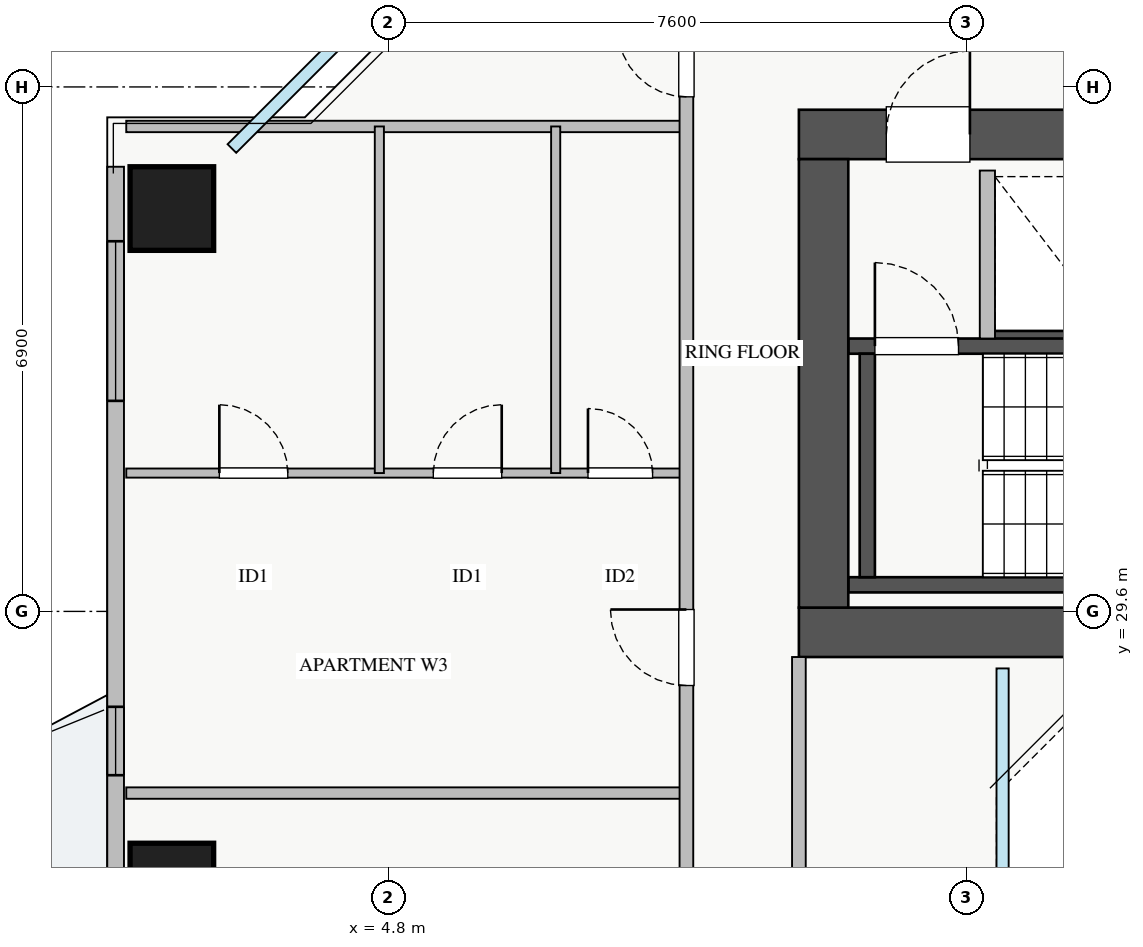
"""IFC4 building model, lengths in metres.
Left out: names, types, materials, properties, quantities, classifications, styles, units other than length and angle.
Written with IfcOpenShell. Run it as: python <this file> out.ifc"""

import sys

from ifc_helpers import new_model, si_unit, direction, frame, frame_2d, origin, origin_2d, place, context, subcontext, project, spatial, rectangle, extrude, source, transform, mapped, element, fill, save


model = new_model("IFC4")
c1 = context("Model", 3, precision=1e-05, world=origin(), true_north=direction((0.0, 1.0)))
c2 = subcontext(c1, "Body", "Model", "MODEL_VIEW")
j1 = project(units=[si_unit("LENGTHUNIT", "METRE"), si_unit("PLANEANGLEUNIT", "RADIAN")], contexts=[c1])
p1 = place(None, origin())
s1 = spatial("IfcSite", under=j1, at=p1, CompositionType="ELEMENT")
p2 = place(p1, origin())
s2 = spatial("IfcBuilding", under=s1, at=p2, CompositionType="ELEMENT")
p3 = place(p2, frame((0.0, 0.0, 123.0)))
s3 = spatial("IfcBuildingStorey", under=s2, at=p3, CompositionType="ELEMENT", Elevation=123.0)
p4 = place(p3, frame((12.68, 33.2, 0.0), z_axis=(0.0, 0.0, 1.0), x_axis=(1.0, 0.0, 0.0)))
e1 = element("IfcWall", 1, at=p4, inside=s3, PredefinedType="SHEAR", context=c2, shape_type="SweptSolid", body=[
    extrude(rectangle(XDim=1.94, YDim=0.18, at=frame_2d((0.97, 0.0))), origin(), (0.0, 0.0, 1.0), 3.07),
])
p5 = place(p3, frame((10.85, 29.95, 0.0), z_axis=(0.0, 0.0, 1.0), x_axis=(1.0, 0.0, 0.0)))
e2 = element("IfcWall", 2, at=p5, inside=s3, PredefinedType="SHEAR", context=c2, shape_type="SweptSolid", body=[
    extrude(rectangle(XDim=7.3, YDim=0.2, at=frame_2d((3.65, 0.0))), origin(), (0.0, 0.0, 1.0), 3.25),
])
p6 = place(p3, frame((10.85, 33.09, 0.0), z_axis=(0.0, 0.0, 1.0), x_axis=(1.0, 0.0, 0.0)))
e3 = element("IfcWall", 3, at=p6, inside=s3, PredefinedType="SHEAR", context=c2, shape_type="SweptSolid", body=[
    extrude(rectangle(XDim=7.3, YDim=0.2, at=frame_2d((3.65, 0.0))), origin(), (0.0, 0.0, 1.0), 3.25),
])
p7 = place(p6, frame((0.35, 0.0, 0.0)))
e4 = element("IfcOpeningElement", 4, at=p7, cuts=e3, PredefinedType="OPENING", context=c2, shape_type="SweptSolid", body=[
    extrude(rectangle(XDim=1.1, YDim=2.05, at=frame_2d((0.55, 1.025))), frame((0.0, 0.11, 0.0), z_axis=(0.0, -1.0, 0.0), x_axis=(1.0, 0.0, 0.0)), (0.0, 0.0, 1.0), 0.22),
])
p8 = place(p3, frame((11.1, 30.05, 0.0), z_axis=(0.0, 0.0, 1.0), x_axis=(0.0, 1.0, 0.0)))
e5 = element("IfcWall", 5, at=p8, inside=s3, PredefinedType="SHEAR", context=c2, shape_type="SweptSolid", body=[
    extrude(rectangle(XDim=2.94, YDim=0.2, at=frame_2d((1.47, 0.0))), origin(), (0.0, 0.0, 1.0), 3.25),
])
p9 = place(p3, frame((10.2, 29.325, 0.0), z_axis=(0.0, 0.0, 1.0), x_axis=(1.0, 0.0, 0.0)))
e6 = element("IfcWall", 6, at=p9, inside=s3, PredefinedType="SHEAR", context=c2, shape_type="SweptSolid", body=[
    extrude(rectangle(XDim=17.6, YDim=0.65, at=frame_2d((8.8, 0.0))), origin(), (0.0, 0.0, 1.0), 3.25),
])
p10 = place(p3, frame((10.2, 35.875, 0.0), z_axis=(0.0, 0.0, 1.0), x_axis=(1.0, 0.0, 0.0)))
e7 = element("IfcWall", 7, at=p10, inside=s3, PredefinedType="SHEAR", context=c2, shape_type="SweptSolid", body=[
    extrude(rectangle(XDim=17.6, YDim=0.65, at=frame_2d((8.8, 0.0))), origin(), (0.0, 0.0, 1.0), 3.25),
])
p11 = place(p10, frame((1.15, 0.0, 0.0)))
e8 = element("IfcOpeningElement", 8, at=p11, cuts=e7, PredefinedType="OPENING", context=c2, shape_type="SweptSolid", body=[
    extrude(rectangle(XDim=1.1, YDim=2.05, at=frame_2d((0.55, 1.025))), frame((0.0, 0.335, 0.0), z_axis=(0.0, -1.0, 0.0), x_axis=(1.0, 0.0, 0.0)), (0.0, 0.0, 1.0), 0.67),
])
p12 = place(p10, frame((8.3, 0.0, 0.0)))
e9 = element("IfcOpeningElement", 9, at=p12, cuts=e7, PredefinedType="OPENING", context=c2, shape_type="SweptSolid", body=[
    extrude(rectangle(XDim=1.1, YDim=2.05, at=frame_2d((0.55, 1.025))), frame((0.0, 0.335, 0.0), z_axis=(0.0, -1.0, 0.0), x_axis=(1.0, 0.0, 0.0)), (0.0, 0.0, 1.0), 0.67),
])
p13 = place(p10, frame((4.9, 0.0, 0.0)))
e10 = element("IfcOpeningElement", 10, at=p13, cuts=e7, PredefinedType="OPENING", context=c2, shape_type="SweptSolid", body=[
    extrude(rectangle(XDim=1.1, YDim=2.05, at=frame_2d((0.55, 1.025))), frame((0.0, 0.335, 0.0), z_axis=(0.0, -1.0, 0.0), x_axis=(1.0, 0.0, 0.0)), (0.0, 0.0, 1.0), 0.67),
])
p14 = place(p10, frame((14.74, 0.0, 0.0)))
e11 = element("IfcOpeningElement", 11, at=p14, cuts=e7, PredefinedType="OPENING", context=c2, shape_type="SweptSolid", body=[
    extrude(rectangle(XDim=1.0, YDim=2.05, at=frame_2d((0.5, 1.025))), frame((0.0, 0.335, 0.0), z_axis=(0.0, -1.0, 0.0), x_axis=(1.0, 0.0, 0.0)), (0.0, 0.0, 1.0), 0.67),
])
p15 = place(p10, frame((10.005, 0.0, 0.0)))
e12 = element("IfcOpeningElement", 12, at=p15, cuts=e7, PredefinedType="OPENING", context=c2, shape_type="SweptSolid", body=[
    extrude(rectangle(XDim=1.0, YDim=2.05, at=frame_2d((0.5, 1.025))), frame((0.0, 0.335, 0.0), z_axis=(0.0, -1.0, 0.0), x_axis=(1.0, 0.0, 0.0)), (0.0, 0.0, 1.0), 0.67),
])
p16 = place(p10, frame((11.55, 0.0, 0.0)))
e13 = element("IfcOpeningElement", 13, at=p16, cuts=e7, PredefinedType="OPENING", context=c2, shape_type="SweptSolid", body=[
    extrude(rectangle(XDim=1.0, YDim=2.05, at=frame_2d((0.5, 1.025))), frame((0.0, 0.335, 0.0), z_axis=(0.0, -1.0, 0.0), x_axis=(1.0, 0.0, 0.0)), (0.0, 0.0, 1.0), 0.67),
])
p17 = place(p10, frame((13.215, 0.0, 0.0)))
e14 = element("IfcOpeningElement", 14, at=p17, cuts=e7, PredefinedType="OPENING", context=c2, shape_type="SweptSolid", body=[
    extrude(rectangle(XDim=1.0, YDim=2.05, at=frame_2d((0.5, 1.025))), frame((0.0, 0.335, 0.0), z_axis=(0.0, -1.0, 0.0), x_axis=(1.0, 0.0, 0.0)), (0.0, 0.0, 1.0), 0.67),
])
p18 = place(p3, frame((10.525, 29.65, 0.0), z_axis=(0.0, 0.0, 1.0), x_axis=(0.0, 1.0, 0.0)))
e15 = element("IfcWall", 15, at=p18, inside=s3, PredefinedType="SHEAR", context=c2, shape_type="SweptSolid", body=[
    extrude(rectangle(XDim=5.9, YDim=0.65, at=frame_2d((2.95, 0.0))), origin(), (0.0, 0.0, 1.0), 3.25),
])
m1 = source(origin(), c2, "Body", "SweptSolid", [
    extrude(rectangle(XDim=1.1, YDim=1.1, at=origin_2d()), origin(), (0.0, 0.0, 1.0), 3.25),
])
for number, where, z_axis, x_axis in (
    (16, (1.95, 34.9, 0.0), (0.0, 0.0, 1.0), (1.0, 0.0, 0.0)),
    (17, (1.95, 26.0, 0.0), (0.0, 0.0, 1.0), (1.0, 0.0, 0.0)),
):
    element("IfcColumn", number, at=place(p3, frame(where, z_axis=z_axis, x_axis=x_axis)), inside=s3, PredefinedType="COLUMN", context=c2, shape_type="MappedRepresentation", body=[
        mapped(m1, transform((0.0, 0.0, 0.0), x_axis=(1.0, 0.0, 0.0), y_axis=(0.0, 1.0, 0.0), z_axis=(0.0, 0.0, 1.0), scale=1.0)),
    ])
p19 = place(p3, frame((1.21, 10.55, 0.0), z_axis=(0.0, 0.0, 1.0), x_axis=(0.0, 1.0, 0.0)))
e18 = element("IfcWall", 18, at=p19, inside=s3, PredefinedType="STANDARD", context=c2, shape_type="SweptSolid", body=[
    extrude(rectangle(XDim=24.9, YDim=0.22, at=frame_2d((12.45, 0.0))), origin(), (0.0, 0.0, 1.0), 2.61),
])
p20 = place(p19, frame((13.3, 0.0, 0.0)))
e19 = element("IfcOpeningElement", 19, at=p20, cuts=e18, PredefinedType="OPENING", context=c2, shape_type="SweptSolid", body=[
    extrude(rectangle(XDim=1.2, YDim=2.1, at=frame_2d((0.6, 1.05))), frame((0.0, 0.12, 0.0), z_axis=(0.0, -1.0, 0.0), x_axis=(1.0, 0.0, 0.0)), (0.0, 0.0, 1.0), 0.24),
])
p21 = place(p19, frame((0.625, 0.0, 0.9)))
e20 = element("IfcOpeningElement", 20, at=p21, cuts=e18, PredefinedType="OPENING", context=c2, shape_type="SweptSolid", body=[
    extrude(rectangle(XDim=2.4, YDim=1.5, at=frame_2d((1.2, 0.75))), frame((0.0, 0.12, 0.0), z_axis=(0.0, -1.0, 0.0), x_axis=(1.0, 0.0, 0.0)), (0.0, 0.0, 1.0), 0.24),
])
p22 = place(p19, frame((21.82, 0.0, 0.9)))
e21 = element("IfcOpeningElement", 21, at=p22, cuts=e18, PredefinedType="OPENING", context=c2, shape_type="SweptSolid", body=[
    extrude(rectangle(XDim=2.1, YDim=1.5, at=frame_2d((1.05, 0.75))), frame((0.0, 0.12, 0.0), z_axis=(0.0, -1.0, 0.0), x_axis=(1.0, 0.0, 0.0)), (0.0, 0.0, 1.0), 0.24),
])
p23 = place(p19, frame((4.847, 0.0, 0.9)))
e22 = element("IfcOpeningElement", 22, at=p23, cuts=e18, PredefinedType="OPENING", context=c2, shape_type="SweptSolid", body=[
    extrude(rectangle(XDim=2.4, YDim=1.5, at=frame_2d((1.2, 0.75))), frame((0.0, 0.12, 0.0), z_axis=(0.0, -1.0, 0.0), x_axis=(1.0, 0.0, 0.0)), (0.0, 0.0, 1.0), 0.24),
])
p24 = place(p19, frame((16.895, 0.0, 0.9)))
e23 = element("IfcOpeningElement", 23, at=p24, cuts=e18, PredefinedType="OPENING", context=c2, shape_type="SweptSolid", body=[
    extrude(rectangle(XDim=0.9, YDim=1.2, at=frame_2d((0.45, 0.6))), frame((0.0, 0.12, 0.0), z_axis=(0.0, -1.0, 0.0), x_axis=(1.0, 0.0, 0.0)), (0.0, 0.0, 1.0), 0.24),
])
p25 = place(p3, frame((12.68, 33.19, 0.0), z_axis=(0.0, 0.0, 1.0), x_axis=(0.0, 1.0, 0.0)))
e24 = element("IfcWall", 24, at=p25, inside=s3, PredefinedType="PARTITIONING", context=c2, shape_type="SweptSolid", body=[
    extrude(rectangle(XDim=2.21, YDim=0.2, at=frame_2d((1.105, 0.0))), origin(), (0.0, 0.0, 1.0), 3.07),
])
p26 = place(p3, frame((1.35, 35.98, 0.0), z_axis=(0.0, 0.0, 1.0), x_axis=(1.0, 0.0, 0.0)))
e25 = element("IfcWall", 25, at=p26, inside=s3, PredefinedType="PARTITIONING", context=c2, shape_type="SweptSolid", body=[
    extrude(rectangle(XDim=7.37, YDim=0.15, at=frame_2d((3.685, 0.0))), origin(), (0.0, 0.0, 1.0), 3.07),
])
p27 = place(p3, frame((1.35, 31.42, 0.0), z_axis=(0.0, 0.0, 1.0), x_axis=(1.0, 0.0, 0.0)))
e26 = element("IfcWall", 26, at=p27, inside=s3, PredefinedType="PLUMBINGWALL", context=c2, shape_type="SweptSolid", body=[
    extrude(rectangle(XDim=7.37, YDim=0.12, at=frame_2d((3.685, 0.0))), origin(), (0.0, 0.0, 1.0), 3.07),
])
p28 = place(p27, frame((1.225, 0.0, 0.0)))
e27 = element("IfcOpeningElement", 27, at=p28, cuts=e26, PredefinedType="OPENING", context=c2, shape_type="SweptSolid", body=[
    extrude(rectangle(XDim=0.9, YDim=2.05, at=frame_2d((0.45, 1.025))), frame((0.0, 0.07, 0.0), z_axis=(0.0, -1.0, 0.0), x_axis=(1.0, 0.0, 0.0)), (0.0, 0.0, 1.0), 0.14),
])
p29 = place(p27, frame((4.04, 0.0, 0.0)))
e28 = element("IfcOpeningElement", 28, at=p29, cuts=e26, PredefinedType="OPENING", context=c2, shape_type="SweptSolid", body=[
    extrude(rectangle(XDim=0.9, YDim=2.05, at=frame_2d((0.45, 1.025))), frame((0.0, 0.07, 0.0), z_axis=(0.0, -1.0, 0.0), x_axis=(1.0, 0.0, 0.0)), (0.0, 0.0, 1.0), 0.14),
])
p30 = place(p27, frame((6.075, 0.0, 0.0)))
e29 = element("IfcOpeningElement", 29, at=p30, cuts=e26, PredefinedType="OPENING", context=c2, shape_type="SweptSolid", body=[
    extrude(rectangle(XDim=0.85, YDim=2.05, at=frame_2d((0.425, 1.025))), frame((0.0, 0.07, 0.0), z_axis=(0.0, -1.0, 0.0), x_axis=(1.0, 0.0, 0.0)), (0.0, 0.0, 1.0), 0.14),
])
p31 = place(p3, frame((4.68, 31.42, 0.0), z_axis=(0.0, 0.0, 1.0), x_axis=(0.0, 1.0, 0.0)))
e30 = element("IfcWall", 30, at=p31, inside=s3, PredefinedType="PLUMBINGWALL", context=c2, shape_type="SweptSolid", body=[
    extrude(rectangle(XDim=4.56, YDim=0.12, at=frame_2d((2.28, 0.0))), origin(), (0.0, 0.0, 1.0), 3.07),
])
p32 = place(p3, frame((7.0, 31.42, 0.0), z_axis=(0.0, 0.0, 1.0), x_axis=(0.0, 1.0, 0.0)))
e31 = element("IfcWall", 31, at=p32, inside=s3, PredefinedType="PLUMBINGWALL", context=c2, shape_type="SweptSolid", body=[
    extrude(rectangle(XDim=4.56, YDim=0.12, at=frame_2d((2.28, 0.0))), origin(), (0.0, 0.0, 1.0), 2.577),
])
p33 = place(p3, frame((1.35, 27.21, 0.0), z_axis=(0.0, 0.0, 1.0), x_axis=(1.0, 0.0, 0.0)))
e32 = element("IfcWall", 32, at=p33, inside=s3, PredefinedType="PARTITIONING", context=c2, shape_type="SweptSolid", body=[
    extrude(rectangle(XDim=7.37, YDim=0.15, at=frame_2d((3.685, 0.0))), origin(), (0.0, 0.0, 1.0), 3.07),
])
p34 = place(p3, frame((8.72, 8.31, 0.0), z_axis=(0.0, 0.0, 1.0), x_axis=(0.0, 1.0, 0.0)))
e33 = element("IfcWall", 33, at=p34, inside=s3, PredefinedType="PARTITIONING", context=c2, shape_type="SweptSolid", body=[
    extrude(rectangle(XDim=29.37, YDim=0.18, at=frame_2d((14.685, 0.0))), origin(), (0.0, 0.0, 1.0), 3.07),
])
p35 = place(p34, frame((28.06, 0.0, 0.0)))
e34 = element("IfcOpeningElement", 34, at=p35, cuts=e33, PredefinedType="OPENING", context=c2, shape_type="SweptSolid", body=[
    extrude(rectangle(XDim=0.9, YDim=2.05, at=frame_2d((0.45, 1.025))), frame((0.0, 0.1, 0.0), z_axis=(0.0, -1.0, 0.0), x_axis=(1.0, 0.0, 0.0)), (0.0, 0.0, 1.0), 0.2),
])
p36 = place(p34, frame((0.24, 0.0, 0.0)))
e35 = element("IfcOpeningElement", 35, at=p36, cuts=e33, PredefinedType="OPENING", context=c2, shape_type="SweptSolid", body=[
    extrude(rectangle(XDim=0.9, YDim=2.05, at=frame_2d((0.45, 1.025))), frame((0.0, 0.1, 0.0), z_axis=(0.0, -1.0, 0.0), x_axis=(1.0, 0.0, 0.0)), (0.0, 0.0, 1.0), 0.2),
])
p37 = place(p34, frame((2.92, 0.0, 0.0)))
e36 = element("IfcOpeningElement", 36, at=p37, cuts=e33, PredefinedType="OPENING", context=c2, shape_type="SweptSolid", body=[
    extrude(rectangle(XDim=1.0, YDim=2.05, at=frame_2d((0.5, 1.025))), frame((0.0, 0.1, 0.0), z_axis=(0.0, -1.0, 0.0), x_axis=(1.0, 0.0, 0.0)), (0.0, 0.0, 1.0), 0.2),
])
p38 = place(p34, frame((14.315, 0.0, 0.0)))
e37 = element("IfcOpeningElement", 37, at=p38, cuts=e33, PredefinedType="OPENING", context=c2, shape_type="SweptSolid", body=[
    extrude(rectangle(XDim=1.0, YDim=2.05, at=frame_2d((0.5, 1.025))), frame((0.0, 0.1, 0.0), z_axis=(0.0, -1.0, 0.0), x_axis=(1.0, 0.0, 0.0)), (0.0, 0.0, 1.0), 0.2),
])
p39 = place(p34, frame((20.315, 0.0, 0.0)))
e38 = element("IfcOpeningElement", 38, at=p39, cuts=e33, PredefinedType="OPENING", context=c2, shape_type="SweptSolid", body=[
    extrude(rectangle(XDim=1.0, YDim=2.05, at=frame_2d((0.5, 1.025))), frame((0.0, 0.1, 0.0), z_axis=(0.0, -1.0, 0.0), x_axis=(1.0, 0.0, 0.0)), (0.0, 0.0, 1.0), 0.2),
])
p40 = place(p3, frame((10.2, 17.0, 0.0), z_axis=(0.0, 0.0, 1.0), x_axis=(0.0, 1.0, 0.0)))
e39 = element("IfcWall", 39, at=p40, inside=s3, PredefinedType="PARTITIONING", context=c2, shape_type="SweptSolid", body=[
    extrude(rectangle(XDim=12.0, YDim=0.18, at=frame_2d((6.0, 0.0))), origin(), (0.0, 0.0, 1.0), 3.07),
])
p41 = place(p40, frame((1.5, 0.0, 0.0)))
e40 = element("IfcOpeningElement", 40, at=p41, cuts=e39, PredefinedType="OPENING", context=c2, shape_type="SweptSolid", body=[
    extrude(rectangle(XDim=0.85, YDim=2.05, at=frame_2d((0.425, 1.025))), frame((0.0, 0.1, 0.0), z_axis=(0.0, -1.0, 0.0), x_axis=(1.0, 0.0, 0.0)), (0.0, 0.0, 1.0), 0.2),
])
p42 = place(p40, frame((6.5, 0.0, 0.0)))
e41 = element("IfcOpeningElement", 41, at=p42, cuts=e39, PredefinedType="OPENING", context=c2, shape_type="SweptSolid", body=[
    extrude(rectangle(XDim=1.0, YDim=2.05, at=frame_2d((0.5, 1.025))), frame((0.0, 0.1, 0.0), z_axis=(0.0, -1.0, 0.0), x_axis=(1.0, 0.0, 0.0)), (0.0, 0.0, 1.0), 0.2),
])
m2 = source(origin(), c2, "Body", "SweptSolid", [
    extrude(rectangle(XDim=2.1, YDim=1.5, at=frame_2d((1.05, 0.75))), frame((0.0, 0.03, 0.0), z_axis=(0.0, -1.0, 0.0), x_axis=(1.0, 0.0, 0.0)), (0.0, 0.0, 1.0), 0.06),
])
p43 = place(p22, origin())
e42 = element("IfcWindow", 42, at=p43, inside=s3, PartitioningType="TRIPLE_PANEL_VERTICAL", PredefinedType="WINDOW", context=c2, shape_type="MappedRepresentation", body=[
    mapped(m2, transform((0.0, 0.0, 0.0), x_axis=(1.0, 0.0, 0.0), y_axis=(0.0, 1.0, 0.0), z_axis=(0.0, 0.0, 1.0), scale=1.0)),
])
fill(e21, e42)
m3 = source(origin(), c2, "Body", "SweptSolid", [
    extrude(rectangle(XDim=1.1, YDim=2.05, at=frame_2d((0.55, 1.025))), frame((0.0, 0.025, 0.0), z_axis=(0.0, -1.0, 0.0), x_axis=(1.0, 0.0, 0.0)), (0.0, 0.0, 1.0), 0.05),
])
p44 = place(p11, origin())
e43 = element("IfcDoor", 43, at=p44, inside=s3, OperationType="SINGLE_SWING_RIGHT", PredefinedType="DOOR", context=c2, shape_type="MappedRepresentation", body=[
    mapped(m3, transform((0.0, 0.0, 0.0), x_axis=(1.0, 0.0, 0.0), y_axis=(0.0, 1.0, 0.0), z_axis=(0.0, 0.0, 1.0), scale=1.0)),
])
fill(e8, e43)
p45 = place(p7, origin())
e44 = element("IfcDoor", 44, at=p45, inside=s3, OperationType="SINGLE_SWING_LEFT", PredefinedType="DOOR", context=c2, shape_type="MappedRepresentation", body=[
    mapped(m3, transform((0.0, 0.0, 0.0), x_axis=(1.0, 0.0, 0.0), y_axis=(0.0, 1.0, 0.0), z_axis=(0.0, 0.0, 1.0), scale=1.0)),
])
fill(e4, e44)
m4 = source(origin(), c2, "Body", "SweptSolid", [
    extrude(rectangle(XDim=0.9, YDim=2.05, at=frame_2d((0.45, 1.025))), frame((0.0, 0.025, 0.0), z_axis=(0.0, -1.0, 0.0), x_axis=(1.0, 0.0, 0.0)), (0.0, 0.0, 1.0), 0.05),
])
p46 = place(p28, origin())
e45 = element("IfcDoor", 45, at=p46, inside=s3, OperationType="SINGLE_SWING_LEFT", PredefinedType="DOOR", context=c2, shape_type="MappedRepresentation", body=[
    mapped(m4, transform((0.0, 0.0, 0.0), x_axis=(1.0, 0.0, 0.0), y_axis=(0.0, 1.0, 0.0), z_axis=(0.0, 0.0, 1.0), scale=1.0)),
])
fill(e27, e45)
p47 = place(p29, origin())
e46 = element("IfcDoor", 46, at=p47, inside=s3, OperationType="SINGLE_SWING_RIGHT", PredefinedType="DOOR", context=c2, shape_type="MappedRepresentation", body=[
    mapped(m4, transform((0.0, 0.0, 0.0), x_axis=(1.0, 0.0, 0.0), y_axis=(0.0, 1.0, 0.0), z_axis=(0.0, 0.0, 1.0), scale=1.0)),
])
fill(e28, e46)
m5 = source(origin(), c2, "Body", "SweptSolid", [
    extrude(rectangle(XDim=0.85, YDim=2.05, at=frame_2d((0.425, 1.025))), frame((0.0, 0.025, 0.0), z_axis=(0.0, -1.0, 0.0), x_axis=(1.0, 0.0, 0.0)), (0.0, 0.0, 1.0), 0.05),
])
p48 = place(p30, origin())
e47 = element("IfcDoor", 47, at=p48, inside=s3, OperationType="SINGLE_SWING_LEFT", PredefinedType="DOOR", context=c2, shape_type="MappedRepresentation", body=[
    mapped(m5, transform((0.0, 0.0, 0.0), x_axis=(1.0, 0.0, 0.0), y_axis=(0.0, 1.0, 0.0), z_axis=(0.0, 0.0, 1.0), scale=1.0)),
])
fill(e29, e47)
p49 = place(p35, origin())
e48 = element("IfcDoor", 48, at=p49, inside=s3, OperationType="SINGLE_SWING_RIGHT", PredefinedType="DOOR", context=c2, shape_type="MappedRepresentation", body=[
    mapped(m4, transform((0.0, 0.0, 0.0), x_axis=(1.0, 0.0, 0.0), y_axis=(0.0, 1.0, 0.0), z_axis=(0.0, 0.0, 1.0), scale=1.0)),
])
fill(e34, e48)
m6 = source(origin(), c2, "Body", "SweptSolid", [
    extrude(rectangle(XDim=1.0, YDim=2.05, at=frame_2d((0.5, 1.025))), frame((0.0, 0.025, 0.0), z_axis=(0.0, -1.0, 0.0), x_axis=(1.0, 0.0, 0.0)), (0.0, 0.0, 1.0), 0.05),
])
p50 = place(p39, origin())
e49 = element("IfcDoor", 49, at=p50, inside=s3, OperationType="SINGLE_SWING_RIGHT", PredefinedType="DOOR", context=c2, shape_type="MappedRepresentation", body=[
    mapped(m6, transform((0.0, 0.0, 0.0), x_axis=(1.0, 0.0, 0.0), y_axis=(0.0, 1.0, 0.0), z_axis=(0.0, 0.0, 1.0), scale=1.0)),
])
fill(e38, e49)
m7 = source(origin(), c2, "Body", "SweptSolid", [
    extrude(rectangle(XDim=0.9, YDim=1.2, at=frame_2d((0.45, 0.6))), frame((0.0, 0.03, 0.0), z_axis=(0.0, -1.0, 0.0), x_axis=(1.0, 0.0, 0.0)), (0.0, 0.0, 1.0), 0.06),
])
p51 = place(p24, origin())
e50 = element("IfcWindow", 50, at=p51, inside=s3, PartitioningType="SINGLE_PANEL", PredefinedType="WINDOW", context=c2, shape_type="MappedRepresentation", body=[
    mapped(m7, transform((0.0, 0.0, 0.0), x_axis=(1.0, 0.0, 0.0), y_axis=(0.0, 1.0, 0.0), z_axis=(0.0, 0.0, 1.0), scale=1.0)),
])
fill(e23, e50)
save(model, sys.argv[1])
